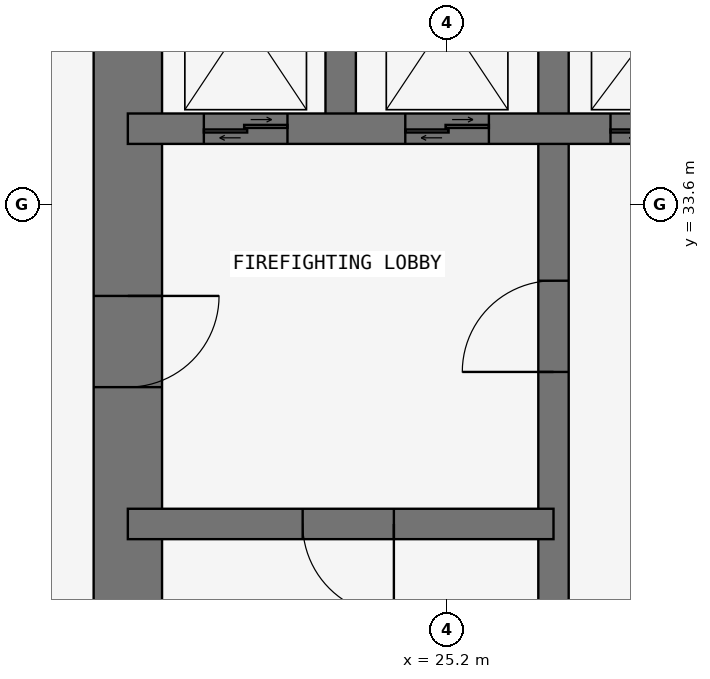
"""IFC4 building model, lengths in metres.
Left out: names, types, materials, properties, quantities, classifications, styles, units other than length and angle.
Written with IfcOpenShell. Run it as: python <this file> out.ifc"""

import sys

from ifc_helpers import new_model, si_unit, direction, frame, frame_2d, origin, place, context, subcontext, project, spatial, rectangle, extrude, element, fill, save


model = new_model("IFC4")
c1 = context("Model", 3, precision=1e-05, world=origin(), true_north=direction((0.0, 1.0)))
c2 = subcontext(c1, "Body", "Model", "MODEL_VIEW")
j1 = project(units=[si_unit("LENGTHUNIT", "METRE"), si_unit("PLANEANGLEUNIT", "RADIAN")], contexts=[c1])
p1 = place(None, origin())
s1 = spatial("IfcSite", under=j1, at=p1, CompositionType="ELEMENT")
p2 = place(p1, origin())
s2 = spatial("IfcBuilding", under=s1, at=p2, CompositionType="ELEMENT")
p3 = place(p2, frame((0.0, 0.0, 173.7)))
s3 = spatial("IfcBuildingStorey", under=s2, at=p3, CompositionType="ELEMENT", Elevation=173.7)
p4 = place(p3, frame((21.0, 37.8, 0.0), z_axis=(0.0, 0.0, 1.0), x_axis=(0.0, -1.0, 0.0)))
e1 = element("IfcWall", 1, at=p4, inside=s3, PredefinedType="SHEAR", context=c2, shape_type="SweptSolid", body=[
    extrude(rectangle(XDim=17.25, YDim=0.9, at=frame_2d((8.625, 0.0))), origin(), (0.0, 0.0, 1.0), 3.6),
])
p5 = place(p4, frame((5.4, 0.0, 0.0)))
e2 = element("IfcOpeningElement", 2, at=p5, cuts=e1, PredefinedType="OPENING", context=c2, shape_type="SweptSolid", body=[
    extrude(rectangle(XDim=1.2, YDim=2.1, at=frame_2d((0.6, 1.05))), frame((0.0, 0.46, 0.0), z_axis=(0.0, -1.0, 0.0), x_axis=(1.0, 0.0, 0.0)), (0.0, 0.0, 1.0), 0.92),
])
p6 = place(p3, frame((26.6, 21.0, 0.0), z_axis=(0.0, 0.0, 1.0), x_axis=(0.0, 1.0, 0.0)))
e3 = element("IfcWall", 3, at=p6, inside=s3, PredefinedType="SHEAR", context=c2, shape_type="SweptSolid", body=[
    extrude(rectangle(XDim=16.8, YDim=0.4, at=frame_2d((8.4, 0.0))), origin(), (0.0, 0.0, 1.0), 3.6),
])
p7 = place(p6, frame((10.4, 0.0, 0.0)))
e4 = element("IfcOpeningElement", 4, at=p7, cuts=e3, PredefinedType="OPENING", context=c2, shape_type="SweptSolid", body=[
    extrude(rectangle(XDim=1.2, YDim=2.1, at=frame_2d((0.6, 1.05))), frame((0.0, 0.21, 0.0), z_axis=(0.0, -1.0, 0.0), x_axis=(1.0, 0.0, 0.0)), (0.0, 0.0, 1.0), 0.42),
])
p8 = place(p3, frame((21.0, 29.4, 0.0), z_axis=(0.0, 0.0, 1.0), x_axis=(1.0, 0.0, 0.0)))
e5 = element("IfcWall", 5, at=p8, inside=s3, PredefinedType="SHEAR", context=c2, shape_type="SweptSolid", body=[
    extrude(rectangle(XDim=5.6, YDim=0.4, at=frame_2d((2.8, 0.0))), origin(), (0.0, 0.0, 1.0), 3.6),
])
p9 = place(p8, frame((2.3, 0.0, 0.0)))
e6 = element("IfcOpeningElement", 6, at=p9, cuts=e5, PredefinedType="OPENING", context=c2, shape_type="SweptSolid", body=[
    extrude(rectangle(XDim=1.2, YDim=2.1, at=frame_2d((0.6, 1.05))), frame((0.0, 0.21, 0.0), z_axis=(0.0, -1.0, 0.0), x_axis=(1.0, 0.0, 0.0)), (0.0, 0.0, 1.0), 0.42),
])
p10 = place(p3, frame((21.0, 34.6, 0.0), z_axis=(0.0, 0.0, 1.0), x_axis=(1.0, 0.0, 0.0)))
e7 = element("IfcWall", 7, at=p10, inside=s3, PredefinedType="SHEAR", context=c2, shape_type="SweptSolid", body=[
    extrude(rectangle(XDim=11.2, YDim=0.4, at=frame_2d((5.6, 0.0))), origin(), (0.0, 0.0, 1.0), 3.6),
])
p11 = place(p10, frame((9.35, 0.0, 0.0)))
e8 = element("IfcOpeningElement", 8, at=p11, cuts=e7, PredefinedType="OPENING", context=c2, shape_type="SweptSolid", body=[
    extrude(rectangle(XDim=0.9, YDim=2.1, at=frame_2d((0.45, 1.05))), frame((0.0, 0.21, 0.0), z_axis=(0.0, -1.0, 0.0), x_axis=(1.0, 0.0, 0.0)), (0.0, 0.0, 1.0), 0.42),
])
p12 = place(p10, frame((1.0, 0.0, 0.0)))
e9 = element("IfcOpeningElement", 9, at=p12, cuts=e7, PredefinedType="OPENING", context=c2, shape_type="SweptSolid", body=[
    extrude(rectangle(XDim=1.1, YDim=2.1, at=frame_2d((0.55, 1.05))), frame((0.0, 0.21, 0.0), z_axis=(0.0, -1.0, 0.0), x_axis=(1.0, 0.0, 0.0)), (0.0, 0.0, 1.0), 0.42),
])
p13 = place(p10, frame((3.65, 0.0, 0.0)))
e10 = element("IfcOpeningElement", 10, at=p13, cuts=e7, PredefinedType="OPENING", context=c2, shape_type="SweptSolid", body=[
    extrude(rectangle(XDim=1.1, YDim=2.1, at=frame_2d((0.55, 1.05))), frame((0.0, 0.21, 0.0), z_axis=(0.0, -1.0, 0.0), x_axis=(1.0, 0.0, 0.0)), (0.0, 0.0, 1.0), 0.42),
])
p14 = place(p10, frame((6.35, 0.0, 0.0)))
e11 = element("IfcOpeningElement", 11, at=p14, cuts=e7, PredefinedType="OPENING", context=c2, shape_type="SweptSolid", body=[
    extrude(rectangle(XDim=1.3, YDim=2.1, at=frame_2d((0.65, 1.05))), frame((0.0, 0.21, 0.0), z_axis=(0.0, -1.0, 0.0), x_axis=(1.0, 0.0, 0.0)), (0.0, 0.0, 1.0), 0.42),
])
p15 = place(p3, frame((23.8, 34.6, 0.0), z_axis=(0.0, 0.0, 1.0), x_axis=(0.0, 1.0, 0.0)))
e12 = element("IfcWall", 12, at=p15, inside=s3, PredefinedType="SHEAR", context=c2, shape_type="SweptSolid", body=[
    extrude(rectangle(XDim=3.2, YDim=0.4, at=frame_2d((1.6, 0.0))), origin(), (0.0, 0.0, 1.0), 3.6),
])
p16 = place(p5, origin())
e13 = element("IfcDoor", 13, at=p16, inside=s3, OperationType="SINGLE_SWING_LEFT", PredefinedType="DOOR", context=c2, shape_type="SweptSolid", body=[
    extrude(rectangle(XDim=1.2, YDim=2.1, at=frame_2d((0.6, 1.05))), frame((0.0, 0.025, 0.0), z_axis=(0.0, -1.0, 0.0), x_axis=(1.0, 0.0, 0.0)), (0.0, 0.0, 1.0), 0.05),
])
fill(e2, e13)
p17 = place(p9, frame((1.2, 0.0, 0.0), z_axis=(0.0, 0.0, 1.0), x_axis=(-1.0, 0.0, 0.0)))
e14 = element("IfcDoor", 14, at=p17, inside=s3, OperationType="SINGLE_SWING_LEFT", PredefinedType="DOOR", context=c2, shape_type="SweptSolid", body=[
    extrude(rectangle(XDim=1.2, YDim=2.1, at=frame_2d((0.6, 1.05))), frame((0.0, 0.025, 0.0), z_axis=(0.0, -1.0, 0.0), x_axis=(1.0, 0.0, 0.0)), (0.0, 0.0, 1.0), 0.05),
])
fill(e6, e14)
p18 = place(p7, origin())
e15 = element("IfcDoor", 15, at=p18, inside=s3, OperationType="SINGLE_SWING_LEFT", PredefinedType="DOOR", context=c2, shape_type="SweptSolid", body=[
    extrude(rectangle(XDim=1.2, YDim=2.1, at=frame_2d((0.6, 1.05))), frame((0.0, 0.025, 0.0), z_axis=(0.0, -1.0, 0.0), x_axis=(1.0, 0.0, 0.0)), (0.0, 0.0, 1.0), 0.05),
])
fill(e4, e15)
p19 = place(p12, origin())
e16 = element("IfcDoor", 16, at=p19, inside=s3, OperationType="DOUBLE_DOOR_SLIDING", PredefinedType="DOOR", context=c2, shape_type="SweptSolid", body=[
    extrude(rectangle(XDim=1.1, YDim=2.1, at=frame_2d((0.55, 1.05))), frame((0.0, 0.025, 0.0), z_axis=(0.0, -1.0, 0.0), x_axis=(1.0, 0.0, 0.0)), (0.0, 0.0, 1.0), 0.05),
])
fill(e9, e16)
p20 = place(p13, origin())
e17 = element("IfcDoor", 17, at=p20, inside=s3, OperationType="DOUBLE_DOOR_SLIDING", PredefinedType="DOOR", context=c2, shape_type="SweptSolid", body=[
    extrude(rectangle(XDim=1.1, YDim=2.1, at=frame_2d((0.55, 1.05))), frame((0.0, 0.025, 0.0), z_axis=(0.0, -1.0, 0.0), x_axis=(1.0, 0.0, 0.0)), (0.0, 0.0, 1.0), 0.05),
])
fill(e10, e17)
p21 = place(p14, origin())
e18 = element("IfcDoor", 18, at=p21, inside=s3, OperationType="DOUBLE_DOOR_SLIDING", PredefinedType="DOOR", context=c2, shape_type="SweptSolid", body=[
    extrude(rectangle(XDim=1.3, YDim=2.1, at=frame_2d((0.65, 1.05))), frame((0.0, 0.025, 0.0), z_axis=(0.0, -1.0, 0.0), x_axis=(1.0, 0.0, 0.0)), (0.0, 0.0, 1.0), 0.05),
])
fill(e11, e18)
save(model, sys.argv[1])
